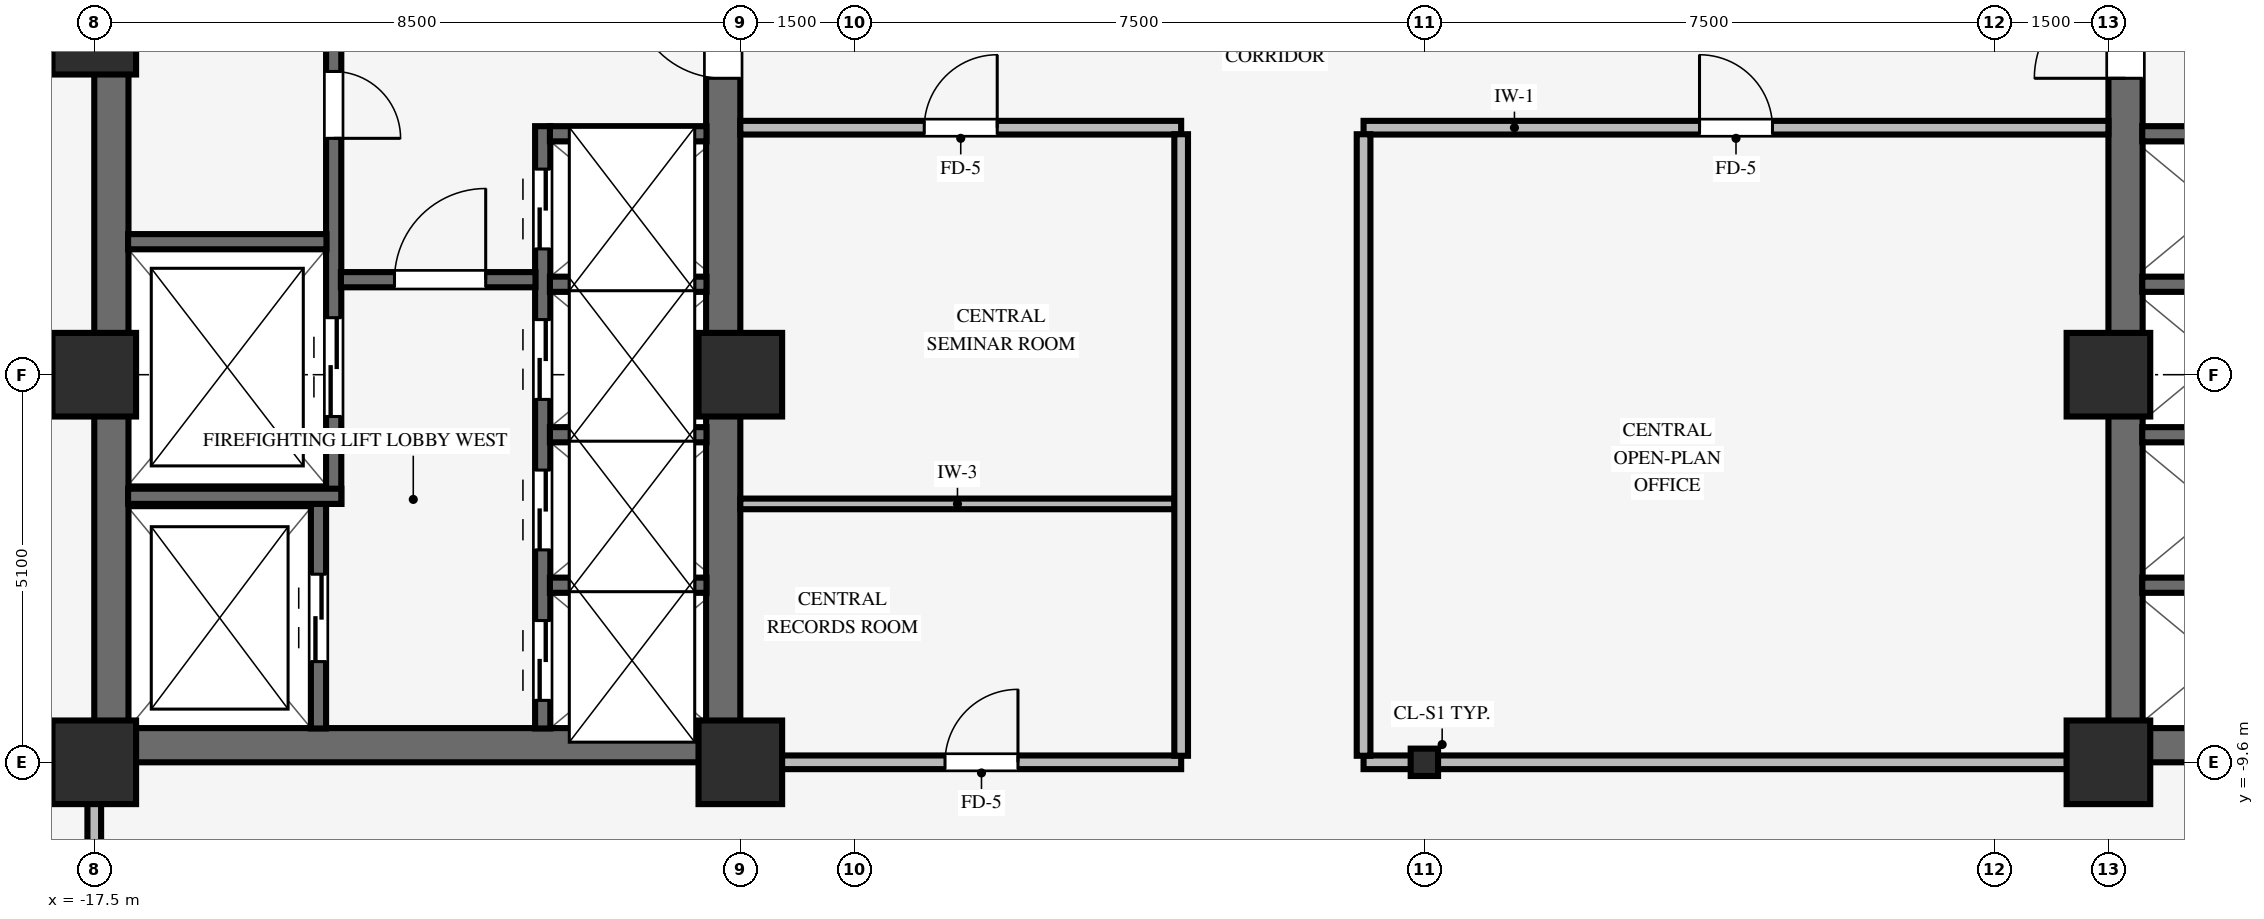
"""IFC4 building model, lengths in metres.
Left out: names, types, materials, properties, quantities, classifications, styles, units other than length and angle.
Written with IfcOpenShell. Run it as: python <this file> out.ifc"""

import sys

from ifc_helpers import new_model, si_unit, direction, frame, frame_2d, origin, origin_2d, place, context, subcontext, project, spatial, rectangle, i_section, extrude, source, transform, mapped, element, fill, save


model = new_model("IFC4")
c1 = context("Model", 3, precision=1e-05, world=origin(), true_north=direction((0.0, 1.0)))
c2 = subcontext(c1, "Body", "Model", "MODEL_VIEW")
j1 = project(units=[si_unit("LENGTHUNIT", "METRE"), si_unit("PLANEANGLEUNIT", "RADIAN")], contexts=[c1])
p1 = place(None, origin())
s1 = spatial("IfcSite", under=j1, at=p1, CompositionType="ELEMENT")
p2 = place(p1, origin())
s2 = spatial("IfcBuilding", under=s1, at=p2, CompositionType="ELEMENT")
p3 = place(p2, frame((0.0, 0.0, 86.0)))
s3 = spatial("IfcBuildingStorey", under=s2, at=p3, CompositionType="ELEMENT", Elevation=86.0)
p4 = place(p3, frame((-17.5, -9.375, 0.0), z_axis=(0.0, 0.0, 1.0), x_axis=(1.0, 0.0, 0.0)))
e1 = element("IfcWall", 1, at=p4, inside=s3, PredefinedType="SHEAR", context=c2, shape_type="SweptSolid", body=[
    extrude(rectangle(XDim=8.5, YDim=0.45, at=frame_2d((4.25, 0.0))), origin(), (0.0, 0.0, 1.0), 3.37),
])
p5 = place(p3, frame((-17.275, -9.155, 0.0), z_axis=(0.0, 0.0, 1.0), x_axis=(0.0, 1.0, 0.0)))
e2 = element("IfcWall", 2, at=p5, inside=s3, PredefinedType="SHEAR", context=c2, shape_type="SweptSolid", body=[
    extrude(rectangle(XDim=18.31, YDim=0.45, at=frame_2d((9.155, 0.0))), origin(), (0.0, 0.0, 1.0), 3.37),
])
p6 = place(p3, frame((-9.225, -9.155, 0.0), z_axis=(0.0, 0.0, 1.0), x_axis=(0.0, 1.0, 0.0)))
e3 = element("IfcWall", 3, at=p6, inside=s3, PredefinedType="SHEAR", context=c2, shape_type="SweptSolid", body=[
    extrude(rectangle(XDim=18.31, YDim=0.45, at=frame_2d((9.155, 0.0))), origin(), (0.0, 0.0, 1.0), 3.37),
])
p7 = place(p6, frame((8.555, 0.0, 0.0)))
e4 = element("IfcOpeningElement", 4, at=p7, cuts=e3, PredefinedType="OPENING", context=c2, shape_type="SweptSolid", body=[
    extrude(rectangle(XDim=1.2, YDim=2.15, at=frame_2d((0.6, 1.075))), frame((0.0, 0.235, 0.0), z_axis=(0.0, -1.0, 0.0), x_axis=(1.0, 0.0, 0.0)), (0.0, 0.0, 1.0), 0.47),
])
p8 = place(p3, frame((9.0, -9.375, 0.0), z_axis=(0.0, 0.0, 1.0), x_axis=(1.0, 0.0, 0.0)))
e5 = element("IfcWall", 5, at=p8, inside=s3, PredefinedType="SHEAR", context=c2, shape_type="SweptSolid", body=[
    extrude(rectangle(XDim=8.5, YDim=0.45, at=frame_2d((4.25, 0.0))), origin(), (0.0, 0.0, 1.0), 3.37),
])
p9 = place(p3, frame((9.225, -9.155, 0.0), z_axis=(0.0, 0.0, 1.0), x_axis=(0.0, 1.0, 0.0)))
e6 = element("IfcWall", 6, at=p9, inside=s3, PredefinedType="SHEAR", context=c2, shape_type="SweptSolid", body=[
    extrude(rectangle(XDim=18.31, YDim=0.45, at=frame_2d((9.155, 0.0))), origin(), (0.0, 0.0, 1.0), 3.37),
])
p10 = place(p9, frame((8.555, 0.0, 0.0)))
e7 = element("IfcOpeningElement", 7, at=p10, cuts=e6, PredefinedType="OPENING", context=c2, shape_type="SweptSolid", body=[
    extrude(rectangle(XDim=1.2, YDim=2.15, at=frame_2d((0.6, 1.075))), frame((0.0, 0.235, 0.0), z_axis=(0.0, -1.0, 0.0), x_axis=(1.0, 0.0, 0.0)), (0.0, 0.0, 1.0), 0.47),
])
for number, where, z_axis, x_axis in (
    (8, (-17.5, -9.6, 0.0), (0.0, 0.0, 1.0), (1.0, 0.0, 0.0)),
    (9, (-17.5, -4.5, 0.0), (0.0, 0.0, 1.0), (1.0, 0.0, 0.0)),
    (10, (-9.0, -9.6, 0.0), (0.0, 0.0, 1.0), (1.0, 0.0, 0.0)),
    (11, (-9.0, -4.5, 0.0), (0.0, 0.0, 1.0), (1.0, 0.0, 0.0)),
    (12, (9.0, -9.6, 0.0), (0.0, 0.0, 1.0), (1.0, 0.0, 0.0)),
    (13, (9.0, -4.5, 0.0), (0.0, 0.0, 1.0), (1.0, 0.0, 0.0)),
    (14, (-17.5, 0.0, 0.0), (0.0, 0.0, 1.0), (1.0, 0.0, 0.0)),
):
    element("IfcColumn", number, at=place(p3, frame(where, z_axis=z_axis, x_axis=x_axis)), inside=s3, PredefinedType="COLUMN", context=c2, shape_type="SweptSolid", body=[
        extrude(rectangle(XDim=1.1, YDim=1.1, at=origin_2d()), origin(), (0.0, 0.0, 1.0), 3.37),
    ])
p11 = place(p3, frame((0.0, -9.6, 0.0), z_axis=(0.0, 0.0, 1.0), x_axis=(1.0, 0.0, 0.0)))
e15 = element("IfcColumn", 15, at=p11, inside=s3, PredefinedType="COLUMN", context=c2, shape_type="SweptSolid", body=[
    extrude(i_section(OverallWidth=0.36, OverallDepth=0.36, WebThickness=0.021, FlangeThickness=0.021, FilletRadius=0.018, at=origin_2d()), origin(), (0.0, 0.0, 1.0), 3.37),
])
p12 = place(p3, frame((-14.55, -9.155, 0.0), z_axis=(0.0, 0.0, 1.0), x_axis=(0.0, 1.0, 0.0)))
e16 = element("IfcWall", 16, at=p12, inside=s3, PredefinedType="SHEAR", context=c2, shape_type="SweptSolid", body=[
    extrude(rectangle(XDim=2.96, YDim=0.2, at=frame_2d((1.48, 0.0))), origin(), (0.0, 0.0, 1.0), 3.37),
])
p13 = place(p12, frame((0.88, 0.0, 0.0)))
e17 = element("IfcOpeningElement", 17, at=p13, cuts=e16, PredefinedType="OPENING", context=c2, shape_type="SweptSolid", body=[
    extrude(rectangle(XDim=1.15, YDim=2.15, at=frame_2d((0.575, 1.075))), frame((0.0, 0.11, 0.0), z_axis=(0.0, -1.0, 0.0), x_axis=(1.0, 0.0, 0.0)), (0.0, 0.0, 1.0), 0.22),
])
p14 = place(p3, frame((-14.35, -6.2, 0.0), z_axis=(0.0, 0.0, 1.0), x_axis=(0.0, 1.0, 0.0)))
e18 = element("IfcWall", 18, at=p14, inside=s3, PredefinedType="SHEAR", context=c2, shape_type="SweptSolid", body=[
    extrude(rectangle(XDim=7.105, YDim=0.2, at=frame_2d((3.552, 0.0))), origin(), (0.0, 0.0, 1.0), 3.37),
])
p15 = place(p14, frame((5.69, 0.0, 0.0), z_axis=(0.0, 0.0, 1.0), x_axis=(-1.0, 0.0, 0.0)))
e19 = element("IfcOpeningElement", 19, at=p15, cuts=e18, PredefinedType="OPENING", context=c2, shape_type="SweptSolid", body=[
    extrude(rectangle(XDim=0.88, YDim=2.1, at=frame_2d((0.44, 1.05))), frame((0.0, 0.11, 0.0), z_axis=(0.0, -1.0, 0.0), x_axis=(1.0, 0.0, 0.0)), (0.0, 0.0, 1.0), 0.22),
])
p16 = place(p14, frame((1.15, 0.0, 0.0)))
e20 = element("IfcOpeningElement", 20, at=p16, cuts=e18, PredefinedType="OPENING", context=c2, shape_type="SweptSolid", body=[
    extrude(rectangle(XDim=1.3, YDim=2.2, at=frame_2d((0.65, 1.1))), frame((0.0, 0.11, 0.0), z_axis=(0.0, -1.0, 0.0), x_axis=(1.0, 0.0, 0.0)), (0.0, 0.0, 1.0), 0.22),
])
p17 = place(p3, frame((-17.055, -6.1, 0.0), z_axis=(0.0, 0.0, 1.0), x_axis=(1.0, 0.0, 0.0)))
e21 = element("IfcWall", 21, at=p17, inside=s3, PredefinedType="SHEAR", context=c2, shape_type="SweptSolid", body=[
    extrude(rectangle(XDim=2.805, YDim=0.2, at=frame_2d((1.402, 0.0))), origin(), (0.0, 0.0, 1.0), 3.37),
])
p18 = place(p3, frame((-17.055, -2.75, 0.0), z_axis=(0.0, 0.0, 1.0), x_axis=(1.0, 0.0, 0.0)))
e22 = element("IfcWall", 22, at=p18, inside=s3, PredefinedType="SHEAR", context=c2, shape_type="SweptSolid", body=[
    extrude(rectangle(XDim=2.61, YDim=0.2, at=frame_2d((1.305, 0.0))), origin(), (0.0, 0.0, 1.0), 3.37),
])
p19 = place(p3, frame((-11.6, -9.155, 0.0), z_axis=(0.0, 0.0, 1.0), x_axis=(0.0, 1.0, 0.0)))
e23 = element("IfcWall", 23, at=p19, inside=s3, PredefinedType="SHEAR", context=c2, shape_type="SweptSolid", body=[
    extrude(rectangle(XDim=7.925, YDim=0.2, at=frame_2d((3.962, 0.0))), origin(), (0.0, 0.0, 1.0), 3.37),
])
p20 = place(p19, frame((0.37, 0.0, 0.0)))
e24 = element("IfcOpeningElement", 24, at=p20, cuts=e23, PredefinedType="OPENING", context=c2, shape_type="SweptSolid", body=[
    extrude(rectangle(XDim=1.05, YDim=2.15, at=frame_2d((0.525, 1.075))), frame((0.0, 0.11, 0.0), z_axis=(0.0, -1.0, 0.0), x_axis=(1.0, 0.0, 0.0)), (0.0, 0.0, 1.0), 0.22),
])
p21 = place(p19, frame((2.35, 0.0, 0.0)))
e25 = element("IfcOpeningElement", 25, at=p21, cuts=e23, PredefinedType="OPENING", context=c2, shape_type="SweptSolid", body=[
    extrude(rectangle(XDim=1.05, YDim=2.15, at=frame_2d((0.525, 1.075))), frame((0.0, 0.11, 0.0), z_axis=(0.0, -1.0, 0.0), x_axis=(1.0, 0.0, 0.0)), (0.0, 0.0, 1.0), 0.22),
])
p22 = place(p19, frame((4.33, 0.0, 0.0)))
e26 = element("IfcOpeningElement", 26, at=p22, cuts=e23, PredefinedType="OPENING", context=c2, shape_type="SweptSolid", body=[
    extrude(rectangle(XDim=1.05, YDim=2.15, at=frame_2d((0.525, 1.075))), frame((0.0, 0.11, 0.0), z_axis=(0.0, -1.0, 0.0), x_axis=(1.0, 0.0, 0.0)), (0.0, 0.0, 1.0), 0.22),
])
p23 = place(p19, frame((6.31, 0.0, 0.0)))
e27 = element("IfcOpeningElement", 27, at=p23, cuts=e23, PredefinedType="OPENING", context=c2, shape_type="SweptSolid", body=[
    extrude(rectangle(XDim=1.05, YDim=2.15, at=frame_2d((0.525, 1.075))), frame((0.0, 0.11, 0.0), z_axis=(0.0, -1.0, 0.0), x_axis=(1.0, 0.0, 0.0)), (0.0, 0.0, 1.0), 0.22),
])
p24 = place(p3, frame((-14.255, -3.25, 0.0), z_axis=(0.0, 0.0, 1.0), x_axis=(1.0, 0.0, 0.0)))
e28 = element("IfcWall", 28, at=p24, inside=s3, PredefinedType="SHEAR", context=c2, shape_type="SweptSolid", body=[
    extrude(rectangle(XDim=2.56, YDim=0.2, at=frame_2d((1.28, 0.0))), origin(), (0.0, 0.0, 1.0), 3.37),
])
p25 = place(p24, frame((0.705, 0.0, 0.0)))
e29 = element("IfcOpeningElement", 29, at=p25, cuts=e28, PredefinedType="OPENING", context=c2, shape_type="SweptSolid", body=[
    extrude(rectangle(XDim=1.2, YDim=2.15, at=frame_2d((0.6, 1.075))), frame((0.0, 0.11, 0.0), z_axis=(0.0, -1.0, 0.0), x_axis=(1.0, 0.0, 0.0)), (0.0, 0.0, 1.0), 0.22),
])
for number, where, z_axis, x_axis in (
    (30, (-11.505, -7.27, 0.0), (0.0, 0.0, 1.0), (1.0, 0.0, 0.0)),
    (31, (-11.505, -5.29, 0.0), (0.0, 0.0, 1.0), (1.0, 0.0, 0.0)),
    (32, (-11.505, -3.31, 0.0), (0.0, 0.0, 1.0), (1.0, 0.0, 0.0)),
    (33, (-11.505, -1.33, 0.0), (0.0, 0.0, 1.0), (1.0, 0.0, 0.0)),
    (34, (9.445, -7.27, 0.0), (0.0, 0.0, 1.0), (1.0, 0.0, 0.0)),
    (35, (9.445, -5.29, 0.0), (0.0, 0.0, 1.0), (1.0, 0.0, 0.0)),
    (36, (9.445, -3.31, 0.0), (0.0, 0.0, 1.0), (1.0, 0.0, 0.0)),
    (37, (9.445, -1.33, 0.0), (0.0, 0.0, 1.0), (1.0, 0.0, 0.0)),
):
    element("IfcWall", number, at=place(p3, frame(where, z_axis=z_axis, x_axis=x_axis)), inside=s3, PredefinedType="SHEAR", context=c2, shape_type="SweptSolid", body=[
        extrude(rectangle(XDim=2.06, YDim=0.2, at=frame_2d((1.03, 0.0))), origin(), (0.0, 0.0, 1.0), 3.37),
    ])
p26 = place(p3, frame((-8.454, -9.6, 0.0), z_axis=(0.0, 0.0, 1.0), x_axis=(1.0, 0.0, 0.0)))
e38 = element("IfcWall", 38, at=p26, inside=s3, PredefinedType="PARTITIONING", context=c2, shape_type="SweptSolid", body=[
    extrude(rectangle(XDim=5.254, YDim=0.18, at=frame_2d((2.627, 0.0))), origin(), (0.0, 0.0, 1.0), 2.405),
])
p27 = place(p26, frame((2.147, 0.0, 0.0)))
e39 = element("IfcOpeningElement", 39, at=p27, cuts=e38, PredefinedType="OPENING", context=c2, shape_type="SweptSolid", body=[
    extrude(rectangle(XDim=0.96, YDim=2.1, at=frame_2d((0.48, 1.05))), frame((0.0, 0.1, 0.0), z_axis=(0.0, -1.0, 0.0), x_axis=(1.0, 0.0, 0.0)), (0.0, 0.0, 1.0), 0.2),
])
p28 = place(p3, frame((-0.8, -9.6, 0.0), z_axis=(0.0, 0.0, 1.0), x_axis=(1.0, 0.0, 0.0)))
e40 = element("IfcWall", 40, at=p28, inside=s3, PredefinedType="PARTITIONING", context=c2, shape_type="SweptSolid", body=[
    extrude(rectangle(XDim=0.624, YDim=0.18, at=frame_2d((0.312, 0.0))), origin(), (0.0, 0.0, 1.0), 2.405),
])
p29 = place(p3, frame((0.176, -9.6, 0.0), z_axis=(0.0, 0.0, 1.0), x_axis=(1.0, 0.0, 0.0)))
e41 = element("IfcWall", 41, at=p29, inside=s3, PredefinedType="PARTITIONING", context=c2, shape_type="SweptSolid", body=[
    extrude(rectangle(XDim=8.278, YDim=0.18, at=frame_2d((4.139, 0.0))), origin(), (0.0, 0.0, 1.0), 2.405),
])
p30 = place(p3, frame((-9.0, -6.2, 0.0), z_axis=(0.0, 0.0, 1.0), x_axis=(1.0, 0.0, 0.0)))
e42 = element("IfcWall", 42, at=p30, inside=s3, PredefinedType="PARTITIONING", context=c2, shape_type="SweptSolid", body=[
    extrude(rectangle(XDim=5.714, YDim=0.14, at=frame_2d((2.857, 0.0))), origin(), (0.0, 0.0, 1.0), 3.36),
])
p31 = place(p3, frame((-9.0, -1.25, 0.0), z_axis=(0.0, 0.0, 1.0), x_axis=(1.0, 0.0, 0.0)))
e43 = element("IfcWall", 43, at=p31, inside=s3, PredefinedType="PARTITIONING", context=c2, shape_type="SweptSolid", body=[
    extrude(rectangle(XDim=5.8, YDim=0.18, at=frame_2d((2.9, 0.0))), origin(), (0.0, 0.0, 1.0), 3.36),
])
p32 = place(p31, frame((2.42, 0.0, 0.0)))
e44 = element("IfcOpeningElement", 44, at=p32, cuts=e43, PredefinedType="OPENING", context=c2, shape_type="SweptSolid", body=[
    extrude(rectangle(XDim=0.96, YDim=2.1, at=frame_2d((0.48, 1.05))), frame((0.0, 0.1, 0.0), z_axis=(0.0, -1.0, 0.0), x_axis=(1.0, 0.0, 0.0)), (0.0, 0.0, 1.0), 0.2),
])
p33 = place(p3, frame((-0.8, -1.25, 0.0), z_axis=(0.0, 0.0, 1.0), x_axis=(1.0, 0.0, 0.0)))
e45 = element("IfcWall", 45, at=p33, inside=s3, PredefinedType="PARTITIONING", context=c2, shape_type="SweptSolid", body=[
    extrude(rectangle(XDim=9.8, YDim=0.18, at=frame_2d((4.9, 0.0))), origin(), (0.0, 0.0, 1.0), 3.36),
])
p34 = place(p33, frame((4.42, 0.0, 0.0)))
e46 = element("IfcOpeningElement", 46, at=p34, cuts=e45, PredefinedType="OPENING", context=c2, shape_type="SweptSolid", body=[
    extrude(rectangle(XDim=0.96, YDim=2.1, at=frame_2d((0.48, 1.05))), frame((0.0, 0.1, 0.0), z_axis=(0.0, -1.0, 0.0), x_axis=(1.0, 0.0, 0.0)), (0.0, 0.0, 1.0), 0.2),
])
p35 = place(p3, frame((-17.5, -11.114, 0.0), z_axis=(0.0, 0.0, 1.0), x_axis=(0.0, 1.0, 0.0)))
e47 = element("IfcWall", 47, at=p35, inside=s3, PredefinedType="PARTITIONING", context=c2, shape_type="SweptSolid", body=[
    extrude(rectangle(XDim=0.968, YDim=0.18, at=frame_2d((0.484, 0.0))), origin(), (0.0, 0.0, 1.0), 2.738),
])
for number, where, z_axis, x_axis in (
    (48, (-3.2, -9.514, 0.0), (0.0, 0.0, 1.0), (0.0, 1.0, 0.0)),
    (49, (-0.8, -9.514, 0.0), (0.0, 0.0, 1.0), (0.0, 1.0, 0.0)),
):
    element("IfcWall", number, at=place(p3, frame(where, z_axis=z_axis, x_axis=x_axis)), inside=s3, PredefinedType="PARTITIONING", context=c2, shape_type="SweptSolid", body=[
        extrude(rectangle(XDim=8.178, YDim=0.18, at=frame_2d((4.089, 0.0))), origin(), (0.0, 0.0, 1.0), 3.36),
    ])
m1 = source(origin(), c2, "Body", "SweptSolid", [
    extrude(rectangle(XDim=0.88, YDim=2.1, at=frame_2d((0.44, 1.05))), frame((0.0, 0.025, 0.0), z_axis=(0.0, -1.0, 0.0), x_axis=(1.0, 0.0, 0.0)), (0.0, 0.0, 1.0), 0.05),
])
p36 = place(p15, origin())
e50 = element("IfcDoor", 50, at=p36, inside=s3, OperationType="SINGLE_SWING_RIGHT", PredefinedType="DOOR", context=c2, shape_type="MappedRepresentation", body=[
    mapped(m1, transform((0.0, 0.0, 0.0), scale=1.0)),
])
fill(e19, e50)
m2 = source(origin(), c2, "Body", "SweptSolid", [
    extrude(rectangle(XDim=1.2, YDim=2.15, at=frame_2d((0.6, 1.075))), frame((0.0, 0.025, 0.0), z_axis=(0.0, -1.0, 0.0), x_axis=(1.0, 0.0, 0.0)), (0.0, 0.0, 1.0), 0.05),
])
p37 = place(p25, origin())
e51 = element("IfcDoor", 51, at=p37, inside=s3, OperationType="SINGLE_SWING_RIGHT", PredefinedType="DOOR", context=c2, shape_type="MappedRepresentation", body=[
    mapped(m2, transform((0.0, 0.0, 0.0), scale=1.0)),
])
fill(e29, e51)
p38 = place(p7, origin())
e52 = element("IfcDoor", 52, at=p38, inside=s3, OperationType="SINGLE_SWING_RIGHT", PredefinedType="DOOR", context=c2, shape_type="MappedRepresentation", body=[
    mapped(m2, transform((0.0, 0.0, 0.0), scale=1.0)),
])
fill(e4, e52)
p39 = place(p10, origin())
e53 = element("IfcDoor", 53, at=p39, inside=s3, OperationType="SINGLE_SWING_LEFT", PredefinedType="DOOR", context=c2, shape_type="MappedRepresentation", body=[
    mapped(m2, transform((0.0, 0.0, 0.0), scale=1.0)),
])
fill(e7, e53)
m3 = source(origin(), c2, "Body", "SweptSolid", [
    extrude(rectangle(XDim=1.15, YDim=2.15, at=frame_2d((0.575, 1.075))), frame((0.0, 0.025, 0.0), z_axis=(0.0, -1.0, 0.0), x_axis=(1.0, 0.0, 0.0)), (0.0, 0.0, 1.0), 0.05),
])
p40 = place(p13, origin())
e54 = element("IfcDoor", 54, at=p40, inside=s3, OperationType="DOUBLE_DOOR_SLIDING", PredefinedType="DOOR", context=c2, shape_type="MappedRepresentation", body=[
    mapped(m3, transform((0.0, 0.0, 0.0), scale=1.0)),
])
fill(e17, e54)
m4 = source(origin(), c2, "Body", "SweptSolid", [
    extrude(rectangle(XDim=1.3, YDim=2.2, at=frame_2d((0.65, 1.1))), frame((0.0, 0.025, 0.0), z_axis=(0.0, -1.0, 0.0), x_axis=(1.0, 0.0, 0.0)), (0.0, 0.0, 1.0), 0.05),
])
p41 = place(p16, origin())
e55 = element("IfcDoor", 55, at=p41, inside=s3, OperationType="DOUBLE_DOOR_SLIDING", PredefinedType="DOOR", context=c2, shape_type="MappedRepresentation", body=[
    mapped(m4, transform((0.0, 0.0, 0.0), scale=1.0)),
])
fill(e20, e55)
m5 = source(origin(), c2, "Body", "SweptSolid", [
    extrude(rectangle(XDim=1.05, YDim=2.15, at=frame_2d((0.525, 1.075))), frame((0.0, 0.025, 0.0), z_axis=(0.0, -1.0, 0.0), x_axis=(1.0, 0.0, 0.0)), (0.0, 0.0, 1.0), 0.05),
])
p42 = place(p20, origin())
e56 = element("IfcDoor", 56, at=p42, inside=s3, OperationType="DOUBLE_DOOR_SLIDING", PredefinedType="DOOR", context=c2, shape_type="MappedRepresentation", body=[
    mapped(m5, transform((0.0, 0.0, 0.0), scale=1.0)),
])
fill(e24, e56)
p43 = place(p21, origin())
e57 = element("IfcDoor", 57, at=p43, inside=s3, OperationType="DOUBLE_DOOR_SLIDING", PredefinedType="DOOR", context=c2, shape_type="MappedRepresentation", body=[
    mapped(m5, transform((0.0, 0.0, 0.0), scale=1.0)),
])
fill(e25, e57)
p44 = place(p22, origin())
e58 = element("IfcDoor", 58, at=p44, inside=s3, OperationType="DOUBLE_DOOR_SLIDING", PredefinedType="DOOR", context=c2, shape_type="MappedRepresentation", body=[
    mapped(m5, transform((0.0, 0.0, 0.0), scale=1.0)),
])
fill(e26, e58)
p45 = place(p23, origin())
e59 = element("IfcDoor", 59, at=p45, inside=s3, OperationType="DOUBLE_DOOR_SLIDING", PredefinedType="DOOR", context=c2, shape_type="MappedRepresentation", body=[
    mapped(m5, transform((0.0, 0.0, 0.0), scale=1.0)),
])
fill(e27, e59)
m6 = source(origin(), c2, "Body", "SweptSolid", [
    extrude(rectangle(XDim=0.96, YDim=2.1, at=frame_2d((0.48, 1.05))), frame((0.0, 0.025, 0.0), z_axis=(0.0, -1.0, 0.0), x_axis=(1.0, 0.0, 0.0)), (0.0, 0.0, 1.0), 0.05),
])
p46 = place(p34, origin())
e60 = element("IfcDoor", 60, at=p46, inside=s3, OperationType="SINGLE_SWING_LEFT", PredefinedType="DOOR", context=c2, shape_type="MappedRepresentation", body=[
    mapped(m6, transform((0.0, 0.0, 0.0), scale=1.0)),
])
fill(e46, e60)
p47 = place(p32, origin())
e61 = element("IfcDoor", 61, at=p47, inside=s3, OperationType="SINGLE_SWING_RIGHT", PredefinedType="DOOR", context=c2, shape_type="MappedRepresentation", body=[
    mapped(m6, transform((0.0, 0.0, 0.0), scale=1.0)),
])
fill(e44, e61)
p48 = place(p27, origin())
e62 = element("IfcDoor", 62, at=p48, inside=s3, OperationType="SINGLE_SWING_RIGHT", PredefinedType="DOOR", context=c2, shape_type="MappedRepresentation", body=[
    mapped(m6, transform((0.0, 0.0, 0.0), scale=1.0)),
])
fill(e39, e62)
save(model, sys.argv[1])
